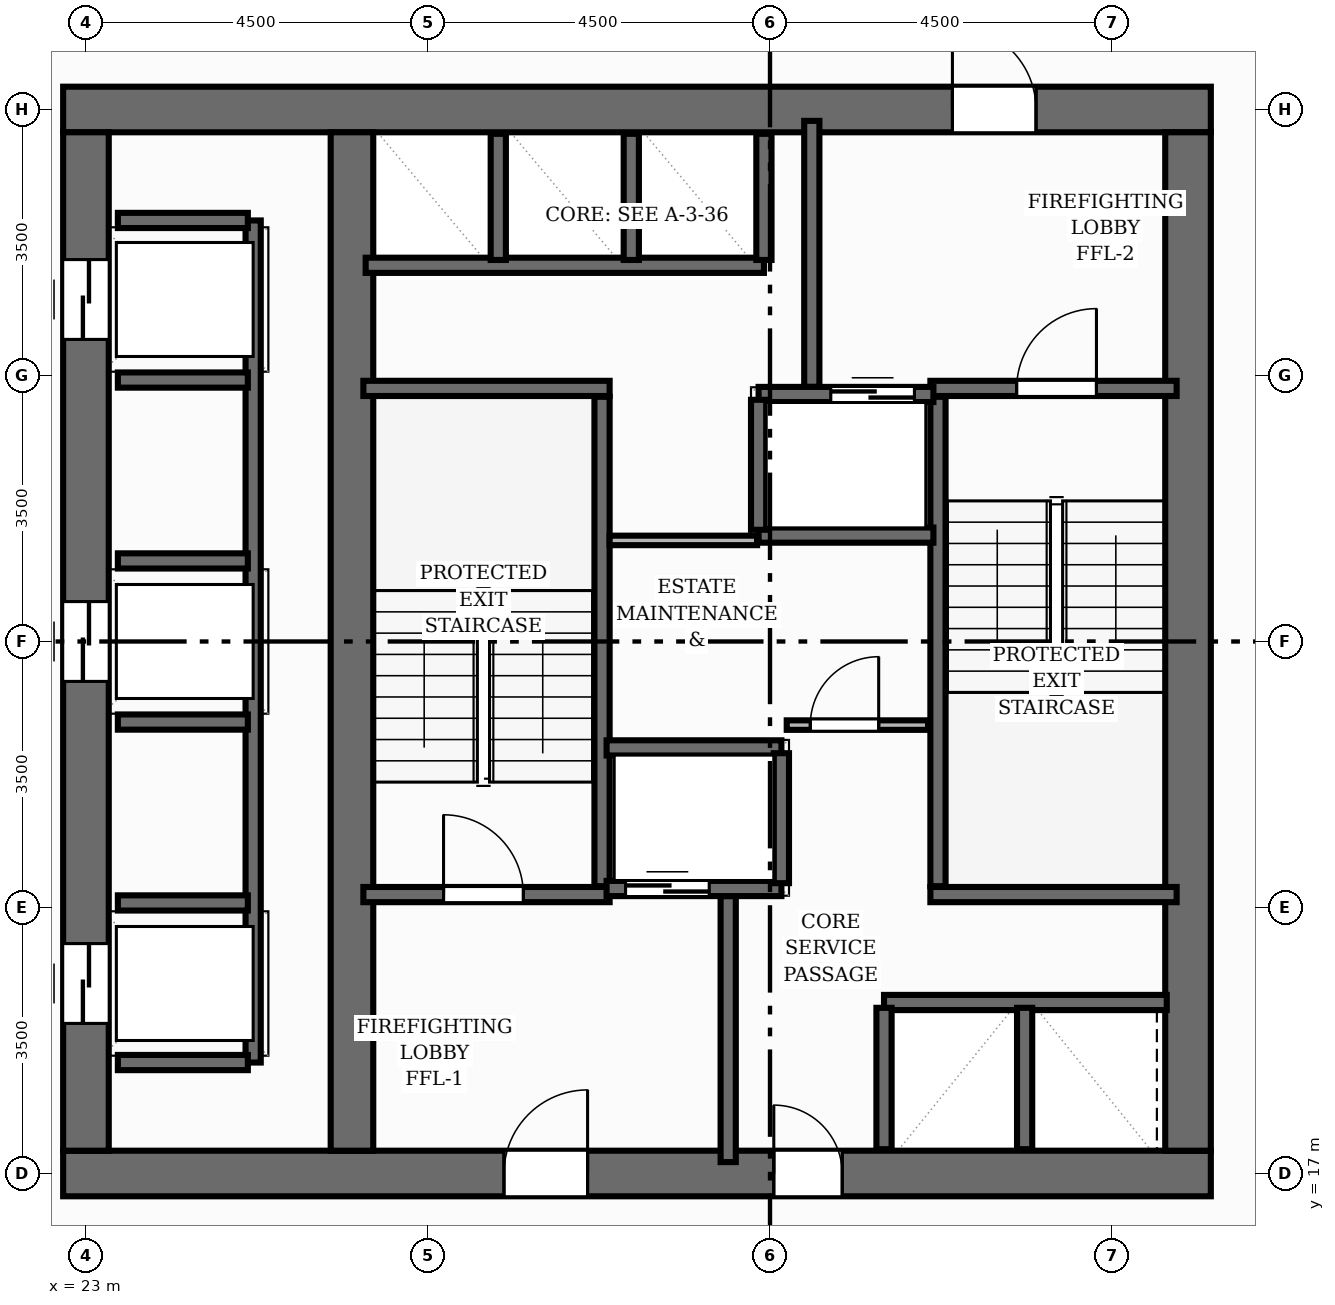
"""IFC4 building model, lengths in metres.
Left out: names, types, materials, properties, quantities, classifications, styles, units other than length and angle.
Written with IfcOpenShell. Run it as: python <this file> out.ifc"""

import sys

from ifc_helpers import new_model, si_unit, direction, frame, frame_2d, origin, place, context, subcontext, project, spatial, rectangle, extrude, element, fill, save


model = new_model("IFC4")
c1 = context("Model", 3, precision=1e-05, world=origin(), true_north=direction((0.0, 1.0)))
c2 = subcontext(c1, "Body", "Model", "MODEL_VIEW")
j1 = project(units=[si_unit("LENGTHUNIT", "METRE"), si_unit("PLANEANGLEUNIT", "RADIAN")], contexts=[c1])
p1 = place(None, origin())
s1 = spatial("IfcSite", under=j1, at=p1, CompositionType="ELEMENT")
p2 = place(p1, origin())
s2 = spatial("IfcBuilding", under=s1, at=p2, CompositionType="ELEMENT")
p3 = place(p2, frame((0.0, 0.0, 148.96)))
s3 = spatial("IfcBuildingStorey", under=s2, at=p3, CompositionType="ELEMENT", Elevation=148.96)
p4 = place(p3, frame((22.7, 17.0, 0.0), z_axis=(0.0, 0.0, 1.0), x_axis=(1.0, 0.0, 0.0)))
e1 = element("IfcWall", 1, at=p4, inside=s3, PredefinedType="SHEAR", context=c2, shape_type="SweptSolid", body=[
    extrude(rectangle(XDim=15.1, YDim=0.6, at=frame_2d((7.55, 0.0))), origin(), (0.0, 0.0, 1.0), 3.2),
])
p5 = place(p4, frame((5.8, 0.0, 0.0)))
e2 = element("IfcOpeningElement", 2, at=p5, cuts=e1, PredefinedType="OPENING", context=c2, shape_type="SweptSolid", body=[
    extrude(rectangle(XDim=1.1, YDim=2.15, at=frame_2d((0.55, 1.075))), frame((0.0, 0.31, 0.0), z_axis=(0.0, -1.0, 0.0), x_axis=(1.0, 0.0, 0.0)), (0.0, 0.0, 1.0), 0.62),
])
p6 = place(p4, frame((9.35, 0.0, 0.0)))
e3 = element("IfcOpeningElement", 3, at=p6, cuts=e1, PredefinedType="OPENING", context=c2, shape_type="SweptSolid", body=[
    extrude(rectangle(XDim=0.9, YDim=2.1, at=frame_2d((0.45, 1.05))), frame((0.0, 0.31, 0.0), z_axis=(0.0, -1.0, 0.0), x_axis=(1.0, 0.0, 0.0)), (0.0, 0.0, 1.0), 0.62),
])
p7 = place(p3, frame((22.7, 31.0, 0.0), z_axis=(0.0, 0.0, 1.0), x_axis=(1.0, 0.0, 0.0)))
e4 = element("IfcWall", 4, at=p7, inside=s3, PredefinedType="SHEAR", context=c2, shape_type="SweptSolid", body=[
    extrude(rectangle(XDim=15.1, YDim=0.6, at=frame_2d((7.55, 0.0))), origin(), (0.0, 0.0, 1.0), 3.2),
])
p8 = place(p7, frame((11.7, 0.0, 0.0)))
e5 = element("IfcOpeningElement", 5, at=p8, cuts=e4, PredefinedType="OPENING", context=c2, shape_type="SweptSolid", body=[
    extrude(rectangle(XDim=1.1, YDim=2.15, at=frame_2d((0.55, 1.075))), frame((0.0, 0.31, 0.0), z_axis=(0.0, -1.0, 0.0), x_axis=(1.0, 0.0, 0.0)), (0.0, 0.0, 1.0), 0.62),
])
p9 = place(p3, frame((23.0, 17.3, 0.0), z_axis=(0.0, 0.0, 1.0), x_axis=(0.0, 1.0, 0.0)))
e6 = element("IfcWall", 6, at=p9, inside=s3, PredefinedType="SHEAR", context=c2, shape_type="SweptSolid", body=[
    extrude(rectangle(XDim=13.4, YDim=0.6, at=frame_2d((6.7, 0.0))), origin(), (0.0, 0.0, 1.0), 3.2),
])
p10 = place(p9, frame((1.675, 0.0, 0.0)))
e7 = element("IfcOpeningElement", 7, at=p10, cuts=e6, PredefinedType="OPENING", context=c2, shape_type="SweptSolid", body=[
    extrude(rectangle(XDim=1.05, YDim=2.15, at=frame_2d((0.525, 1.075))), frame((0.0, 0.31, 0.0), z_axis=(0.0, -1.0, 0.0), x_axis=(1.0, 0.0, 0.0)), (0.0, 0.0, 1.0), 0.62),
])
p11 = place(p9, frame((6.175, 0.0, 0.0)))
e8 = element("IfcOpeningElement", 8, at=p11, cuts=e6, PredefinedType="OPENING", context=c2, shape_type="SweptSolid", body=[
    extrude(rectangle(XDim=1.05, YDim=2.15, at=frame_2d((0.525, 1.075))), frame((0.0, 0.31, 0.0), z_axis=(0.0, -1.0, 0.0), x_axis=(1.0, 0.0, 0.0)), (0.0, 0.0, 1.0), 0.62),
])
p12 = place(p9, frame((10.675, 0.0, 0.0)))
e9 = element("IfcOpeningElement", 9, at=p12, cuts=e6, PredefinedType="OPENING", context=c2, shape_type="SweptSolid", body=[
    extrude(rectangle(XDim=1.05, YDim=2.15, at=frame_2d((0.525, 1.075))), frame((0.0, 0.31, 0.0), z_axis=(0.0, -1.0, 0.0), x_axis=(1.0, 0.0, 0.0)), (0.0, 0.0, 1.0), 0.62),
])
p13 = place(p3, frame((37.5, 17.3, 0.0), z_axis=(0.0, 0.0, 1.0), x_axis=(0.0, 1.0, 0.0)))
e10 = element("IfcWall", 10, at=p13, inside=s3, PredefinedType="SHEAR", context=c2, shape_type="SweptSolid", body=[
    extrude(rectangle(XDim=13.4, YDim=0.6, at=frame_2d((6.7, 0.0))), origin(), (0.0, 0.0, 1.0), 3.2),
])
p14 = place(p3, frame((26.5, 17.3, 0.0), z_axis=(0.0, 0.0, 1.0), x_axis=(0.0, 1.0, 0.0)))
e11 = element("IfcWall", 11, at=p14, inside=s3, PredefinedType="SHEAR", context=c2, shape_type="SweptSolid", body=[
    extrude(rectangle(XDim=13.4, YDim=0.56, at=frame_2d((6.7, 0.0))), origin(), (0.0, 0.0, 1.0), 3.2),
])
p15 = place(p3, frame((29.79, 20.78, 0.0), z_axis=(0.0, 0.0, 1.0), x_axis=(0.0, 1.0, 0.0)))
e12 = element("IfcWall", 12, at=p15, inside=s3, PredefinedType="SHEAR", context=c2, shape_type="SweptSolid", body=[
    extrude(rectangle(XDim=6.44, YDim=0.2, at=frame_2d((3.22, 0.0))), origin(), (0.0, 0.0, 1.0), 3.2),
])
p16 = place(p3, frame((26.65, 27.33, 0.0), z_axis=(0.0, 0.0, 1.0), x_axis=(1.0, 0.0, 0.0)))
e13 = element("IfcWall", 13, at=p16, inside=s3, PredefinedType="SHEAR", context=c2, shape_type="SweptSolid", body=[
    extrude(rectangle(XDim=3.24, YDim=0.2, at=frame_2d((1.62, 0.0))), origin(), (0.0, 0.0, 1.0), 3.2),
])
p17 = place(p3, frame((26.65, 20.67, 0.0), z_axis=(0.0, 0.0, 1.0), x_axis=(1.0, 0.0, 0.0)))
e14 = element("IfcWall", 14, at=p17, inside=s3, PredefinedType="SHEAR", context=c2, shape_type="SweptSolid", body=[
    extrude(rectangle(XDim=3.24, YDim=0.2, at=frame_2d((1.62, 0.0))), origin(), (0.0, 0.0, 1.0), 3.2),
])
p18 = place(p17, frame((1.055, 0.0, 0.0)))
e15 = element("IfcOpeningElement", 15, at=p18, cuts=e14, PredefinedType="OPENING", context=c2, shape_type="SweptSolid", body=[
    extrude(rectangle(XDim=1.05, YDim=2.15, at=frame_2d((0.525, 1.075))), frame((0.0, 0.11, 0.0), z_axis=(0.0, -1.0, 0.0), x_axis=(1.0, 0.0, 0.0)), (0.0, 0.0, 1.0), 0.22),
])
p19 = place(p3, frame((34.21, 20.78, 0.0), z_axis=(0.0, 0.0, 1.0), x_axis=(0.0, 1.0, 0.0)))
e16 = element("IfcWall", 16, at=p19, inside=s3, PredefinedType="SHEAR", context=c2, shape_type="SweptSolid", body=[
    extrude(rectangle(XDim=6.44, YDim=0.2, at=frame_2d((3.22, 0.0))), origin(), (0.0, 0.0, 1.0), 3.2),
])
p20 = place(p3, frame((34.11, 20.67, 0.0), z_axis=(0.0, 0.0, 1.0), x_axis=(1.0, 0.0, 0.0)))
e17 = element("IfcWall", 17, at=p20, inside=s3, PredefinedType="SHEAR", context=c2, shape_type="SweptSolid", body=[
    extrude(rectangle(XDim=3.24, YDim=0.2, at=frame_2d((1.62, 0.0))), origin(), (0.0, 0.0, 1.0), 3.2),
])
p21 = place(p3, frame((34.11, 27.33, 0.0), z_axis=(0.0, 0.0, 1.0), x_axis=(1.0, 0.0, 0.0)))
e18 = element("IfcWall", 18, at=p21, inside=s3, PredefinedType="SHEAR", context=c2, shape_type="SweptSolid", body=[
    extrude(rectangle(XDim=3.24, YDim=0.2, at=frame_2d((1.62, 0.0))), origin(), (0.0, 0.0, 1.0), 3.2),
])
p22 = place(p21, frame((1.135, 0.0, 0.0)))
e19 = element("IfcOpeningElement", 19, at=p22, cuts=e18, PredefinedType="OPENING", context=c2, shape_type="SweptSolid", body=[
    extrude(rectangle(XDim=1.05, YDim=2.15, at=frame_2d((0.525, 1.075))), frame((0.0, 0.11, 0.0), z_axis=(0.0, -1.0, 0.0), x_axis=(1.0, 0.0, 0.0)), (0.0, 0.0, 1.0), 0.22),
])
for number, where, z_axis, x_axis in (
    (20, (31.45, 17.15, 0.0), (0.0, 0.0, 1.0), (0.0, 1.0, 0.0)),
    (21, (32.55, 27.35, 0.0), (0.0, 0.0, 1.0), (0.0, 1.0, 0.0)),
):
    element("IfcWall", number, at=place(p3, frame(where, z_axis=z_axis, x_axis=x_axis)), inside=s3, PredefinedType="SHEAR", context=c2, shape_type="SweptSolid", body=[
        extrude(rectangle(XDim=3.5, YDim=0.2, at=frame_2d((1.75, 0.0))), origin(), (0.0, 0.0, 1.0), 3.2),
    ])
p23 = place(p3, frame((29.85, 20.75, 0.0), z_axis=(0.0, 0.0, 1.0), x_axis=(1.0, 0.0, 0.0)))
e22 = element("IfcWall", 22, at=p23, inside=s3, PredefinedType="SHEAR", context=c2, shape_type="SweptSolid", body=[
    extrude(rectangle(XDim=2.3, YDim=0.2, at=frame_2d((1.15, 0.0))), origin(), (0.0, 0.0, 1.0), 3.2),
])
p24 = place(p23, frame((0.25, 0.0, 0.0)))
e23 = element("IfcOpeningElement", 23, at=p24, cuts=e22, PredefinedType="OPENING", context=c2, shape_type="SweptSolid", body=[
    extrude(rectangle(XDim=1.1, YDim=2.15, at=frame_2d((0.55, 1.075))), frame((0.0, 0.11, 0.0), z_axis=(0.0, -1.0, 0.0), x_axis=(1.0, 0.0, 0.0)), (0.0, 0.0, 1.0), 0.22),
])
p25 = place(p3, frame((29.85, 22.6, 0.0), z_axis=(0.0, 0.0, 1.0), x_axis=(1.0, 0.0, 0.0)))
e24 = element("IfcWall", 24, at=p25, inside=s3, PredefinedType="SHEAR", context=c2, shape_type="SweptSolid", body=[
    extrude(rectangle(XDim=2.3, YDim=0.2, at=frame_2d((1.15, 0.0))), origin(), (0.0, 0.0, 1.0), 3.2),
])
p26 = place(p3, frame((32.15, 20.82, 0.0), z_axis=(0.0, 0.0, 1.0), x_axis=(0.0, 1.0, 0.0)))
e25 = element("IfcWall", 25, at=p26, inside=s3, PredefinedType="SHEAR", context=c2, shape_type="SweptSolid", body=[
    extrude(rectangle(XDim=1.71, YDim=0.2, at=frame_2d((0.855, 0.0))), origin(), (0.0, 0.0, 1.0), 3.2),
])
p27 = place(p3, frame((31.85, 27.25, 0.0), z_axis=(0.0, 0.0, 1.0), x_axis=(1.0, 0.0, 0.0)))
e26 = element("IfcWall", 26, at=p27, inside=s3, PredefinedType="SHEAR", context=c2, shape_type="SweptSolid", body=[
    extrude(rectangle(XDim=2.3, YDim=0.2, at=frame_2d((1.15, 0.0))), origin(), (0.0, 0.0, 1.0), 3.2),
])
p28 = place(p27, frame((0.95, 0.0, 0.0)))
e27 = element("IfcOpeningElement", 27, at=p28, cuts=e26, PredefinedType="OPENING", context=c2, shape_type="SweptSolid", body=[
    extrude(rectangle(XDim=1.1, YDim=2.15, at=frame_2d((0.55, 1.075))), frame((0.0, 0.11, 0.0), z_axis=(0.0, -1.0, 0.0), x_axis=(1.0, 0.0, 0.0)), (0.0, 0.0, 1.0), 0.22),
])
p29 = place(p3, frame((31.85, 25.4, 0.0), z_axis=(0.0, 0.0, 1.0), x_axis=(1.0, 0.0, 0.0)))
e28 = element("IfcWall", 28, at=p29, inside=s3, PredefinedType="SHEAR", context=c2, shape_type="SweptSolid", body=[
    extrude(rectangle(XDim=2.3, YDim=0.2, at=frame_2d((1.15, 0.0))), origin(), (0.0, 0.0, 1.0), 3.2),
])
p30 = place(p3, frame((31.85, 25.47, 0.0), z_axis=(0.0, 0.0, 1.0), x_axis=(0.0, 1.0, 0.0)))
e29 = element("IfcWall", 29, at=p30, inside=s3, PredefinedType="SHEAR", context=c2, shape_type="SweptSolid", body=[
    extrude(rectangle(XDim=1.71, YDim=0.2, at=frame_2d((0.855, 0.0))), origin(), (0.0, 0.0, 1.0), 3.2),
])
p31 = place(p3, frame((25.2, 18.46, 0.0), z_axis=(0.0, 0.0, 1.0), x_axis=(0.0, 1.0, 0.0)))
e30 = element("IfcWall", 30, at=p31, inside=s3, PredefinedType="SHEAR", context=c2, shape_type="SweptSolid", body=[
    extrude(rectangle(XDim=11.08, YDim=0.2, at=frame_2d((5.54, 0.0))), origin(), (0.0, 0.0, 1.0), 3.2),
])
for number, where, z_axis, x_axis in (
    (31, (23.42, 18.46, 0.0), (0.0, 0.0, 1.0), (1.0, 0.0, 0.0)),
    (32, (23.42, 29.54, 0.0), (0.0, 0.0, 1.0), (1.0, 0.0, 0.0)),
    (33, (23.42, 20.56, 0.0), (0.0, 0.0, 1.0), (1.0, 0.0, 0.0)),
    (34, (23.42, 22.94, 0.0), (0.0, 0.0, 1.0), (1.0, 0.0, 0.0)),
    (35, (23.42, 25.06, 0.0), (0.0, 0.0, 1.0), (1.0, 0.0, 0.0)),
    (36, (23.42, 27.44, 0.0), (0.0, 0.0, 1.0), (1.0, 0.0, 0.0)),
):
    element("IfcWall", number, at=place(p3, frame(where, z_axis=z_axis, x_axis=x_axis)), inside=s3, PredefinedType="SHEAR", context=c2, shape_type="SweptSolid", body=[
        extrude(rectangle(XDim=1.71, YDim=0.2, at=frame_2d((0.855, 0.0))), origin(), (0.0, 0.0, 1.0), 3.2),
    ])
p32 = place(p3, frame((26.68, 28.95, 0.0), z_axis=(0.0, 0.0, 1.0), x_axis=(1.0, 0.0, 0.0)))
e37 = element("IfcWall", 37, at=p32, inside=s3, PredefinedType="SHEAR", context=c2, shape_type="SweptSolid", body=[
    extrude(rectangle(XDim=5.24, YDim=0.2, at=frame_2d((2.62, 0.0))), origin(), (0.0, 0.0, 1.0), 3.2),
])
for number, where, z_axis, x_axis in (
    (38, (31.92, 29.02, 0.0), (0.0, 0.0, 1.0), (0.0, 1.0, 0.0)),
    (39, (28.425, 29.02, 0.0), (0.0, 0.0, 1.0), (0.0, 1.0, 0.0)),
    (40, (30.175, 29.02, 0.0), (0.0, 0.0, 1.0), (0.0, 1.0, 0.0)),
):
    element("IfcWall", number, at=place(p3, frame(where, z_axis=z_axis, x_axis=x_axis)), inside=s3, PredefinedType="SHEAR", context=c2, shape_type="SweptSolid", body=[
        extrude(rectangle(XDim=1.66, YDim=0.2, at=frame_2d((0.83, 0.0))), origin(), (0.0, 0.0, 1.0), 3.2),
    ])
p33 = place(p3, frame((33.5, 19.25, 0.0), z_axis=(0.0, 0.0, 1.0), x_axis=(1.0, 0.0, 0.0)))
e41 = element("IfcWall", 41, at=p33, inside=s3, PredefinedType="SHEAR", context=c2, shape_type="SweptSolid", body=[
    extrude(rectangle(XDim=3.72, YDim=0.2, at=frame_2d((1.86, 0.0))), origin(), (0.0, 0.0, 1.0), 3.2),
])
for number, where, z_axis, x_axis in (
    (42, (33.5, 17.32, 0.0), (0.0, 0.0, 1.0), (0.0, 1.0, 0.0)),
    (43, (35.35, 17.32, 0.0), (0.0, 0.0, 1.0), (0.0, 1.0, 0.0)),
):
    element("IfcWall", number, at=place(p3, frame(where, z_axis=z_axis, x_axis=x_axis)), inside=s3, PredefinedType="SHEAR", context=c2, shape_type="SweptSolid", body=[
        extrude(rectangle(XDim=1.86, YDim=0.2, at=frame_2d((0.93, 0.0))), origin(), (0.0, 0.0, 1.0), 3.2),
    ])
p34 = place(p3, frame((32.22, 22.9, 0.0), z_axis=(0.0, 0.0, 1.0), x_axis=(1.0, 0.0, 0.0)))
e44 = element("IfcWall", 44, at=p34, inside=s3, PredefinedType="PARTITIONING", context=c2, shape_type="SweptSolid", body=[
    extrude(rectangle(XDim=1.86, YDim=0.125, at=frame_2d((0.93, 0.0))), origin(), (0.0, 0.0, 1.0), 2.955),
])
p35 = place(p34, frame((0.31, 0.0, 0.0)))
e45 = element("IfcOpeningElement", 45, at=p35, cuts=e44, PredefinedType="OPENING", context=c2, shape_type="SweptSolid", body=[
    extrude(rectangle(XDim=0.9, YDim=2.1, at=frame_2d((0.45, 1.05))), frame((0.0, 0.073, 0.0), z_axis=(0.0, -1.0, 0.0), x_axis=(1.0, 0.0, 0.0)), (0.0, 0.0, 1.0), 0.145),
])
p36 = place(p3, frame((29.89, 25.33, 0.0), z_axis=(0.0, 0.0, 1.0), x_axis=(1.0, 0.0, 0.0)))
e46 = element("IfcWall", 46, at=p36, inside=s3, PredefinedType="PARTITIONING", context=c2, shape_type="SweptSolid", body=[
    extrude(rectangle(XDim=1.94, YDim=0.125, at=frame_2d((0.97, 0.0))), origin(), (0.0, 0.0, 1.0), 2.955),
])
p37 = place(p3, frame((43.184, 17.96, 0.0), z_axis=(0.0, 0.0, 1.0), x_axis=(-0.790862802872, -0.611993486104, 0.0)))
e47 = element("IfcWall", 47, at=p37, inside=s3, PredefinedType="PARTITIONING", context=c2, shape_type="SweptSolid", body=[
    extrude(rectangle(XDim=9.975, YDim=0.125, at=frame_2d((4.987, 0.0))), origin(), (0.0, 0.0, 1.0), 2.411),
])
p38 = place(p37, frame((3.417, 0.0, 0.0)))
e48 = element("IfcOpeningElement", 48, at=p38, cuts=e47, PredefinedType="OPENING", context=c2, shape_type="SweptSolid", body=[
    extrude(rectangle(XDim=0.9, YDim=2.1, at=frame_2d((0.45, 1.05))), frame((0.0, 0.073, 0.0), z_axis=(0.0, -1.0, 0.0), x_axis=(1.0, 0.0, 0.0)), (0.0, 0.0, 1.0), 0.145),
])
p39 = place(p18, origin())
e49 = element("IfcDoor", 49, at=p39, inside=s3, OperationType="SINGLE_SWING_LEFT", PredefinedType="DOOR", context=c2, shape_type="SweptSolid", body=[
    extrude(rectangle(XDim=1.05, YDim=2.15, at=frame_2d((0.525, 1.075))), frame((0.0, 0.025, 0.0), z_axis=(0.0, -1.0, 0.0), x_axis=(1.0, 0.0, 0.0)), (0.0, 0.0, 1.0), 0.05),
])
fill(e15, e49)
p40 = place(p22, origin())
e50 = element("IfcDoor", 50, at=p40, inside=s3, OperationType="SINGLE_SWING_RIGHT", PredefinedType="DOOR", context=c2, shape_type="SweptSolid", body=[
    extrude(rectangle(XDim=1.05, YDim=2.15, at=frame_2d((0.525, 1.075))), frame((0.0, 0.025, 0.0), z_axis=(0.0, -1.0, 0.0), x_axis=(1.0, 0.0, 0.0)), (0.0, 0.0, 1.0), 0.05),
])
fill(e19, e50)
p41 = place(p5, origin())
e51 = element("IfcDoor", 51, at=p41, inside=s3, OperationType="SINGLE_SWING_RIGHT", PredefinedType="DOOR", context=c2, shape_type="SweptSolid", body=[
    extrude(rectangle(XDim=1.1, YDim=2.15, at=frame_2d((0.55, 1.075))), frame((0.0, 0.025, 0.0), z_axis=(0.0, -1.0, 0.0), x_axis=(1.0, 0.0, 0.0)), (0.0, 0.0, 1.0), 0.05),
])
fill(e2, e51)
p42 = place(p8, origin())
e52 = element("IfcDoor", 52, at=p42, inside=s3, OperationType="SINGLE_SWING_LEFT", PredefinedType="DOOR", context=c2, shape_type="SweptSolid", body=[
    extrude(rectangle(XDim=1.1, YDim=2.15, at=frame_2d((0.55, 1.075))), frame((0.0, 0.025, 0.0), z_axis=(0.0, -1.0, 0.0), x_axis=(1.0, 0.0, 0.0)), (0.0, 0.0, 1.0), 0.05),
])
fill(e5, e52)
p43 = place(p24, origin())
e53 = element("IfcDoor", 53, at=p43, inside=s3, OperationType="DOUBLE_DOOR_SLIDING", PredefinedType="DOOR", context=c2, shape_type="SweptSolid", body=[
    extrude(rectangle(XDim=1.1, YDim=2.15, at=frame_2d((0.55, 1.075))), frame((0.0, 0.025, 0.0), z_axis=(0.0, -1.0, 0.0), x_axis=(1.0, 0.0, 0.0)), (0.0, 0.0, 1.0), 0.05),
])
fill(e23, e53)
p44 = place(p28, origin())
e54 = element("IfcDoor", 54, at=p44, inside=s3, OperationType="DOUBLE_DOOR_SLIDING", PredefinedType="DOOR", context=c2, shape_type="SweptSolid", body=[
    extrude(rectangle(XDim=1.1, YDim=2.15, at=frame_2d((0.55, 1.075))), frame((0.0, 0.025, 0.0), z_axis=(0.0, -1.0, 0.0), x_axis=(1.0, 0.0, 0.0)), (0.0, 0.0, 1.0), 0.05),
])
fill(e27, e54)
p45 = place(p10, origin())
e55 = element("IfcDoor", 55, at=p45, inside=s3, OperationType="DOUBLE_DOOR_SLIDING", PredefinedType="DOOR", context=c2, shape_type="SweptSolid", body=[
    extrude(rectangle(XDim=1.05, YDim=2.15, at=frame_2d((0.525, 1.075))), frame((0.0, 0.025, 0.0), z_axis=(0.0, -1.0, 0.0), x_axis=(1.0, 0.0, 0.0)), (0.0, 0.0, 1.0), 0.05),
])
fill(e7, e55)
p46 = place(p11, origin())
e56 = element("IfcDoor", 56, at=p46, inside=s3, OperationType="DOUBLE_DOOR_SLIDING", PredefinedType="DOOR", context=c2, shape_type="SweptSolid", body=[
    extrude(rectangle(XDim=1.05, YDim=2.15, at=frame_2d((0.525, 1.075))), frame((0.0, 0.025, 0.0), z_axis=(0.0, -1.0, 0.0), x_axis=(1.0, 0.0, 0.0)), (0.0, 0.0, 1.0), 0.05),
])
fill(e8, e56)
p47 = place(p12, origin())
e57 = element("IfcDoor", 57, at=p47, inside=s3, OperationType="DOUBLE_DOOR_SLIDING", PredefinedType="DOOR", context=c2, shape_type="SweptSolid", body=[
    extrude(rectangle(XDim=1.05, YDim=2.15, at=frame_2d((0.525, 1.075))), frame((0.0, 0.025, 0.0), z_axis=(0.0, -1.0, 0.0), x_axis=(1.0, 0.0, 0.0)), (0.0, 0.0, 1.0), 0.05),
])
fill(e9, e57)
p48 = place(p6, origin())
e58 = element("IfcDoor", 58, at=p48, inside=s3, OperationType="SINGLE_SWING_LEFT", PredefinedType="DOOR", context=c2, shape_type="SweptSolid", body=[
    extrude(rectangle(XDim=0.9, YDim=2.1, at=frame_2d((0.45, 1.05))), frame((0.0, 0.025, 0.0), z_axis=(0.0, -1.0, 0.0), x_axis=(1.0, 0.0, 0.0)), (0.0, 0.0, 1.0), 0.05),
])
fill(e3, e58)
p49 = place(p35, origin())
e59 = element("IfcDoor", 59, at=p49, inside=s3, OperationType="SINGLE_SWING_RIGHT", PredefinedType="DOOR", context=c2, shape_type="SweptSolid", body=[
    extrude(rectangle(XDim=0.9, YDim=2.1, at=frame_2d((0.45, 1.05))), frame((0.0, 0.025, 0.0), z_axis=(0.0, -1.0, 0.0), x_axis=(1.0, 0.0, 0.0)), (0.0, 0.0, 1.0), 0.05),
])
fill(e45, e59)
save(model, sys.argv[1])
